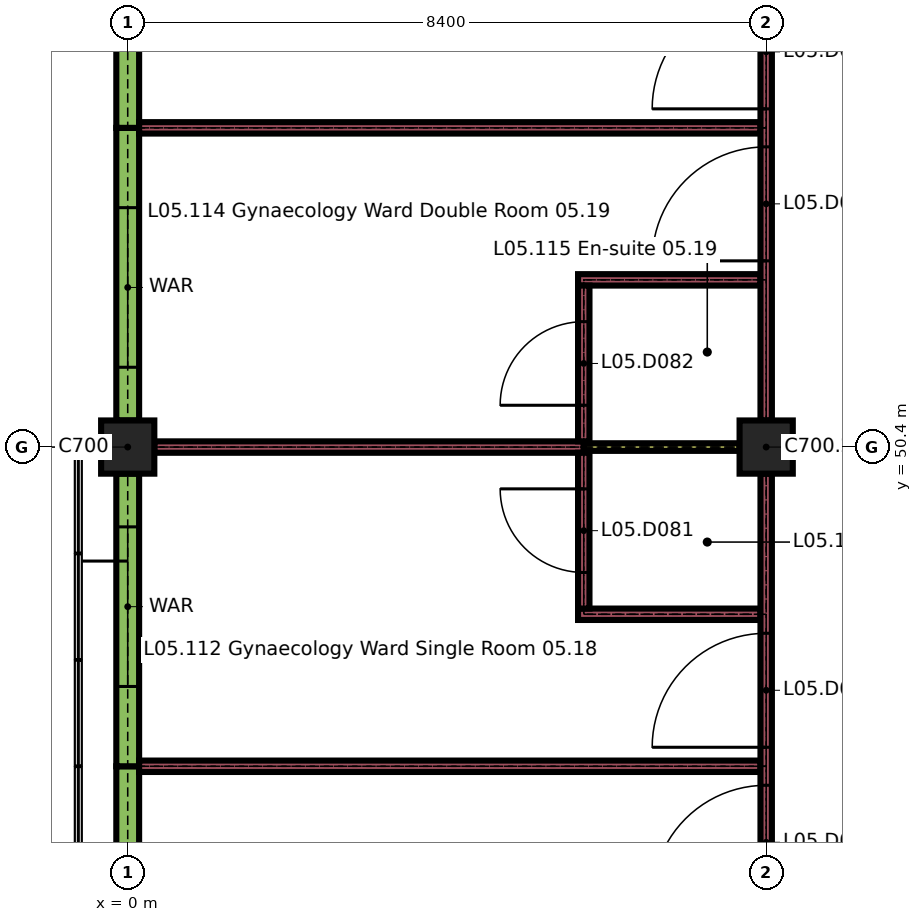
"""IFC4 building model, lengths in metres.
Left out: names, types, materials, properties, quantities, classifications, styles, units other than length and angle.
Written with IfcOpenShell. Run it as: python <this file> out.ifc"""

import sys

from ifc_helpers import new_model, si_unit, direction, frame, frame_2d, origin, origin_2d, place, context, subcontext, project, spatial, rectangle, extrude, element, fill, save


model = new_model("IFC4")
c1 = context("Model", 3, precision=1e-05, world=origin(), true_north=direction((0.0, 1.0)))
c2 = subcontext(c1, "Body", "Model", "MODEL_VIEW")
j1 = project(units=[si_unit("LENGTHUNIT", "METRE"), si_unit("PLANEANGLEUNIT", "RADIAN")], contexts=[c1])
p1 = place(None, origin())
s1 = spatial("IfcSite", under=j1, at=p1, CompositionType="ELEMENT")
p2 = place(p1, origin())
s2 = spatial("IfcBuilding", under=s1, at=p2, CompositionType="ELEMENT")
p3 = place(p2, frame((0.0, 0.0, 22.5)))
s3 = spatial("IfcBuildingStorey", under=s2, at=p3, CompositionType="ELEMENT", Elevation=22.5)
for number, where, z_axis, x_axis in (
    (1, (0.0, 50.4, 0.0), (0.0, 0.0, 1.0), (1.0, 0.0, 0.0)),
    (2, (8.4, 50.4, 0.0), (0.0, 0.0, 1.0), (1.0, 0.0, 0.0)),
):
    element("IfcColumn", number, at=place(p3, frame(where, z_axis=z_axis, x_axis=x_axis)), inside=s3, PredefinedType="COLUMN", context=c2, shape_type="SweptSolid", body=[
        extrude(rectangle(XDim=0.7, YDim=0.7, at=origin_2d()), origin(), (0.0, 0.0, 1.0), 3.26),
    ])
p4 = place(p3, frame((0.0, 42.35, 0.0), z_axis=(0.0, 0.0, 1.0), x_axis=(0.0, 1.0, 0.0)))
e3 = element("IfcWall", 3, at=p4, inside=s3, PredefinedType="SOLIDWALL", context=c2, shape_type="SweptSolid", body=[
    extrude(rectangle(XDim=3.85, YDim=0.3, at=frame_2d((1.925, 0.0))), origin(), (0.0, 0.0, 1.0), 2.96),
])
p5 = place(p4, frame((0.7, 0.0, 0.9)))
e4 = element("IfcOpeningElement", 4, at=p5, cuts=e3, PredefinedType="OPENING", context=c2, shape_type="SweptSolid", body=[
    extrude(rectangle(XDim=2.1, YDim=1.5, at=frame_2d((1.05, 0.75))), frame((0.0, 0.16, 0.0), z_axis=(0.0, -1.0, 0.0), x_axis=(1.0, 0.0, 0.0)), (0.0, 0.0, 1.0), 0.32),
])
p6 = place(p3, frame((0.0, 46.2, 0.0), z_axis=(0.0, 0.0, 1.0), x_axis=(0.0, 1.0, 0.0)))
e5 = element("IfcWall", 5, at=p6, inside=s3, PredefinedType="SOLIDWALL", context=c2, shape_type="SweptSolid", body=[
    extrude(rectangle(XDim=3.85, YDim=0.3, at=frame_2d((1.925, 0.0))), origin(), (0.0, 0.0, 1.0), 2.96),
])
p7 = place(p6, frame((1.05, 0.0, 0.9)))
e6 = element("IfcOpeningElement", 6, at=p7, cuts=e5, PredefinedType="OPENING", context=c2, shape_type="SweptSolid", body=[
    extrude(rectangle(XDim=2.1, YDim=1.5, at=frame_2d((1.05, 0.75))), frame((0.0, 0.16, 0.0), z_axis=(0.0, -1.0, 0.0), x_axis=(1.0, 0.0, 0.0)), (0.0, 0.0, 1.0), 0.32),
])
p8 = place(p3, frame((0.0, 50.75, 0.0), z_axis=(0.0, 0.0, 1.0), x_axis=(0.0, 1.0, 0.0)))
e7 = element("IfcWall", 7, at=p8, inside=s3, PredefinedType="SOLIDWALL", context=c2, shape_type="SweptSolid", body=[
    extrude(rectangle(XDim=3.85, YDim=0.3, at=frame_2d((1.925, 0.0))), origin(), (0.0, 0.0, 1.0), 2.96),
])
p9 = place(p8, frame((0.7, 0.0, 0.9)))
e8 = element("IfcOpeningElement", 8, at=p9, cuts=e7, PredefinedType="OPENING", context=c2, shape_type="SweptSolid", body=[
    extrude(rectangle(XDim=2.1, YDim=1.5, at=frame_2d((1.05, 0.75))), frame((0.0, 0.16, 0.0), z_axis=(0.0, -1.0, 0.0), x_axis=(1.0, 0.0, 0.0)), (0.0, 0.0, 1.0), 0.32),
])
p10 = place(p3, frame((0.0, 54.6, 0.0), z_axis=(0.0, 0.0, 1.0), x_axis=(0.0, 1.0, 0.0)))
e9 = element("IfcWall", 9, at=p10, inside=s3, PredefinedType="SOLIDWALL", context=c2, shape_type="SweptSolid", body=[
    extrude(rectangle(XDim=3.85, YDim=0.3, at=frame_2d((1.925, 0.0))), origin(), (0.0, 0.0, 1.0), 2.96),
])
p11 = place(p10, frame((1.05, 0.0, 0.9)))
e10 = element("IfcOpeningElement", 10, at=p11, cuts=e9, PredefinedType="OPENING", context=c2, shape_type="SweptSolid", body=[
    extrude(rectangle(XDim=2.1, YDim=1.5, at=frame_2d((1.05, 0.75))), frame((0.0, 0.16, 0.0), z_axis=(0.0, -1.0, 0.0), x_axis=(1.0, 0.0, 0.0)), (0.0, 0.0, 1.0), 0.32),
])
p12 = place(p3, frame((0.15, 46.2, 0.0), z_axis=(0.0, 0.0, 1.0), x_axis=(1.0, 0.0, 0.0)))
e11 = element("IfcWall", 11, at=p12, inside=s3, PredefinedType="PARTITIONING", context=c2, shape_type="SweptSolid", body=[
    extrude(rectangle(XDim=8.175, YDim=0.15, at=frame_2d((4.087, 0.0))), origin(), (0.0, 0.0, 1.0), 3.26),
])
p13 = place(p3, frame((5.925, 48.2, 0.0), z_axis=(0.0, 0.0, 1.0), x_axis=(1.0, 0.0, 0.0)))
e12 = element("IfcWall", 12, at=p13, inside=s3, PredefinedType="PARTITIONING", context=c2, shape_type="SweptSolid", body=[
    extrude(rectangle(XDim=2.4, YDim=0.15, at=frame_2d((1.2, 0.0))), origin(), (0.0, 0.0, 1.0), 3.26),
])
p14 = place(p3, frame((0.35, 50.4, 0.0), z_axis=(0.0, 0.0, 1.0), x_axis=(1.0, 0.0, 0.0)))
e13 = element("IfcWall", 13, at=p14, inside=s3, PredefinedType="PARTITIONING", context=c2, shape_type="SweptSolid", body=[
    extrude(rectangle(XDim=5.65, YDim=0.15, at=frame_2d((2.825, 0.0))), origin(), (0.0, 0.0, 1.0), 3.26),
])
p15 = place(p3, frame((6.0, 50.4, 0.0), z_axis=(0.0, 0.0, 1.0), x_axis=(1.0, 0.0, 0.0)))
e14 = element("IfcWall", 14, at=p15, inside=s3, PredefinedType="PARTITIONING", context=c2, shape_type="SweptSolid", body=[
    extrude(rectangle(XDim=2.05, YDim=0.1, at=frame_2d((1.025, 0.0))), origin(), (0.0, 0.0, 1.0), 3.26),
])
p16 = place(p3, frame((5.925, 52.6, 0.0), z_axis=(0.0, 0.0, 1.0), x_axis=(1.0, 0.0, 0.0)))
e15 = element("IfcWall", 15, at=p16, inside=s3, PredefinedType="PARTITIONING", context=c2, shape_type="SweptSolid", body=[
    extrude(rectangle(XDim=2.4, YDim=0.15, at=frame_2d((1.2, 0.0))), origin(), (0.0, 0.0, 1.0), 3.26),
])
p17 = place(p3, frame((0.15, 54.6, 0.0), z_axis=(0.0, 0.0, 1.0), x_axis=(1.0, 0.0, 0.0)))
e16 = element("IfcWall", 16, at=p17, inside=s3, PredefinedType="PARTITIONING", context=c2, shape_type="SweptSolid", body=[
    extrude(rectangle(XDim=8.175, YDim=0.15, at=frame_2d((4.087, 0.0))), origin(), (0.0, 0.0, 1.0), 3.26),
])
p18 = place(p3, frame((6.0, 48.275, 0.0), z_axis=(0.0, 0.0, 1.0), x_axis=(0.0, 1.0, 0.0)))
e17 = element("IfcWall", 17, at=p18, inside=s3, PredefinedType="PARTITIONING", context=c2, shape_type="SweptSolid", body=[
    extrude(rectangle(XDim=2.05, YDim=0.15, at=frame_2d((1.025, 0.0))), origin(), (0.0, 0.0, 1.0), 3.26),
])
p19 = place(p18, frame((0.475, 0.0, 0.0)))
e18 = element("IfcOpeningElement", 18, at=p19, cuts=e17, PredefinedType="OPENING", context=c2, shape_type="SweptSolid", body=[
    extrude(rectangle(XDim=1.1, YDim=2.1, at=frame_2d((0.55, 1.05))), frame((0.0, 0.085, 0.0), z_axis=(0.0, -1.0, 0.0), x_axis=(1.0, 0.0, 0.0)), (0.0, 0.0, 1.0), 0.17),
])
p20 = place(p3, frame((6.0, 50.475, 0.0), z_axis=(0.0, 0.0, 1.0), x_axis=(0.0, 1.0, 0.0)))
e19 = element("IfcWall", 19, at=p20, inside=s3, PredefinedType="PARTITIONING", context=c2, shape_type="SweptSolid", body=[
    extrude(rectangle(XDim=2.05, YDim=0.15, at=frame_2d((1.025, 0.0))), origin(), (0.0, 0.0, 1.0), 3.26),
])
p21 = place(p20, frame((0.475, 0.0, 0.0)))
e20 = element("IfcOpeningElement", 20, at=p21, cuts=e19, PredefinedType="OPENING", context=c2, shape_type="SweptSolid", body=[
    extrude(rectangle(XDim=1.1, YDim=2.1, at=frame_2d((0.55, 1.05))), frame((0.0, 0.085, 0.0), z_axis=(0.0, -1.0, 0.0), x_axis=(1.0, 0.0, 0.0)), (0.0, 0.0, 1.0), 0.17),
])
p22 = place(p3, frame((8.4, 42.35, 0.0), z_axis=(0.0, 0.0, 1.0), x_axis=(0.0, 1.0, 0.0)))
e21 = element("IfcWall", 21, at=p22, inside=s3, PredefinedType="PARTITIONING", context=c2, shape_type="SweptSolid", body=[
    extrude(rectangle(XDim=7.7, YDim=0.15, at=frame_2d((3.85, 0.0))), origin(), (0.0, 0.0, 1.0), 3.26),
])
p23 = place(p22, frame((2.1, 0.0, 0.0)))
e22 = element("IfcOpeningElement", 22, at=p23, cuts=e21, PredefinedType="OPENING", context=c2, shape_type="SweptSolid", body=[
    extrude(rectangle(XDim=1.5, YDim=2.4, at=frame_2d((0.75, 1.2))), frame((0.0, 0.085, 0.0), z_axis=(0.0, -1.0, 0.0), x_axis=(1.0, 0.0, 0.0)), (0.0, 0.0, 1.0), 0.17),
])
p24 = place(p22, frame((4.1, 0.0, 0.0)))
e23 = element("IfcOpeningElement", 23, at=p24, cuts=e21, PredefinedType="OPENING", context=c2, shape_type="SweptSolid", body=[
    extrude(rectangle(XDim=1.5, YDim=2.4, at=frame_2d((0.75, 1.2))), frame((0.0, 0.085, 0.0), z_axis=(0.0, -1.0, 0.0), x_axis=(1.0, 0.0, 0.0)), (0.0, 0.0, 1.0), 0.17),
])
p25 = place(p3, frame((8.4, 50.75, 0.0), z_axis=(0.0, 0.0, 1.0), x_axis=(0.0, 1.0, 0.0)))
e24 = element("IfcWall", 24, at=p25, inside=s3, PredefinedType="PARTITIONING", context=c2, shape_type="SweptSolid", body=[
    extrude(rectangle(XDim=7.7, YDim=0.15, at=frame_2d((3.85, 0.0))), origin(), (0.0, 0.0, 1.0), 3.26),
])
p26 = place(p25, frame((2.1, 0.0, 0.0)))
e25 = element("IfcOpeningElement", 25, at=p26, cuts=e24, PredefinedType="OPENING", context=c2, shape_type="SweptSolid", body=[
    extrude(rectangle(XDim=1.5, YDim=2.4, at=frame_2d((0.75, 1.2))), frame((0.0, 0.085, 0.0), z_axis=(0.0, -1.0, 0.0), x_axis=(1.0, 0.0, 0.0)), (0.0, 0.0, 1.0), 0.17),
])
p27 = place(p25, frame((4.1, 0.0, 0.0)))
e26 = element("IfcOpeningElement", 26, at=p27, cuts=e24, PredefinedType="OPENING", context=c2, shape_type="SweptSolid", body=[
    extrude(rectangle(XDim=1.5, YDim=2.4, at=frame_2d((0.75, 1.2))), frame((0.0, 0.085, 0.0), z_axis=(0.0, -1.0, 0.0), x_axis=(1.0, 0.0, 0.0)), (0.0, 0.0, 1.0), 0.17),
])
p28 = place(p7, origin())
e27 = element("IfcWindow", 27, at=p28, inside=s3, PartitioningType="DOUBLE_PANEL_VERTICAL", PredefinedType="WINDOW", context=c2, shape_type="SweptSolid", body=[
    extrude(rectangle(XDim=2.1, YDim=1.5, at=frame_2d((1.05, 0.75))), frame((0.0, 0.05, 0.0), z_axis=(0.0, -1.0, 0.0), x_axis=(1.0, 0.0, 0.0)), (0.0, 0.0, 1.0), 0.1),
])
fill(e6, e27)
p29 = place(p9, origin())
e28 = element("IfcWindow", 28, at=p29, inside=s3, PartitioningType="DOUBLE_PANEL_VERTICAL", PredefinedType="WINDOW", context=c2, shape_type="SweptSolid", body=[
    extrude(rectangle(XDim=2.1, YDim=1.5, at=frame_2d((1.05, 0.75))), frame((0.0, 0.05, 0.0), z_axis=(0.0, -1.0, 0.0), x_axis=(1.0, 0.0, 0.0)), (0.0, 0.0, 1.0), 0.1),
])
fill(e8, e28)
p30 = place(p19, origin())
e29 = element("IfcDoor", 29, at=p30, inside=s3, OperationType="SINGLE_SWING_LEFT", PredefinedType="DOOR", context=c2, shape_type="SweptSolid", body=[
    extrude(rectangle(XDim=1.1, YDim=2.1, at=frame_2d((0.55, 1.05))), frame((0.0, 0.025, 0.0), z_axis=(0.0, -1.0, 0.0), x_axis=(1.0, 0.0, 0.0)), (0.0, 0.0, 1.0), 0.05),
])
fill(e18, e29)
p31 = place(p21, origin())
e30 = element("IfcDoor", 30, at=p31, inside=s3, OperationType="SINGLE_SWING_RIGHT", PredefinedType="DOOR", context=c2, shape_type="SweptSolid", body=[
    extrude(rectangle(XDim=1.1, YDim=2.1, at=frame_2d((0.55, 1.05))), frame((0.0, 0.025, 0.0), z_axis=(0.0, -1.0, 0.0), x_axis=(1.0, 0.0, 0.0)), (0.0, 0.0, 1.0), 0.05),
])
fill(e20, e30)
p32 = place(p23, origin())
e31 = element("IfcDoor", 31, at=p32, inside=s3, OperationType="SINGLE_SWING_RIGHT", PredefinedType="DOOR", context=c2, shape_type="SweptSolid", body=[
    extrude(rectangle(XDim=1.5, YDim=2.4, at=frame_2d((0.75, 1.2))), frame((0.0, 0.03, 0.0), z_axis=(0.0, -1.0, 0.0), x_axis=(1.0, 0.0, 0.0)), (0.0, 0.0, 1.0), 0.06),
])
fill(e22, e31)
p33 = place(p24, origin())
e32 = element("IfcDoor", 32, at=p33, inside=s3, OperationType="SINGLE_SWING_RIGHT", PredefinedType="DOOR", context=c2, shape_type="SweptSolid", body=[
    extrude(rectangle(XDim=1.5, YDim=2.4, at=frame_2d((0.75, 1.2))), frame((0.0, 0.03, 0.0), z_axis=(0.0, -1.0, 0.0), x_axis=(1.0, 0.0, 0.0)), (0.0, 0.0, 1.0), 0.06),
])
fill(e23, e32)
p34 = place(p26, origin())
e33 = element("IfcDoor", 33, at=p34, inside=s3, OperationType="SINGLE_SWING_RIGHT", PredefinedType="DOOR", context=c2, shape_type="SweptSolid", body=[
    extrude(rectangle(XDim=1.5, YDim=2.4, at=frame_2d((0.75, 1.2))), frame((0.0, 0.03, 0.0), z_axis=(0.0, -1.0, 0.0), x_axis=(1.0, 0.0, 0.0)), (0.0, 0.0, 1.0), 0.06),
])
fill(e25, e33)
p35 = place(p27, origin())
e34 = element("IfcDoor", 34, at=p35, inside=s3, OperationType="SINGLE_SWING_RIGHT", PredefinedType="DOOR", context=c2, shape_type="SweptSolid", body=[
    extrude(rectangle(XDim=1.5, YDim=2.4, at=frame_2d((0.75, 1.2))), frame((0.0, 0.03, 0.0), z_axis=(0.0, -1.0, 0.0), x_axis=(1.0, 0.0, 0.0)), (0.0, 0.0, 1.0), 0.06),
])
fill(e26, e34)
save(model, sys.argv[1])
